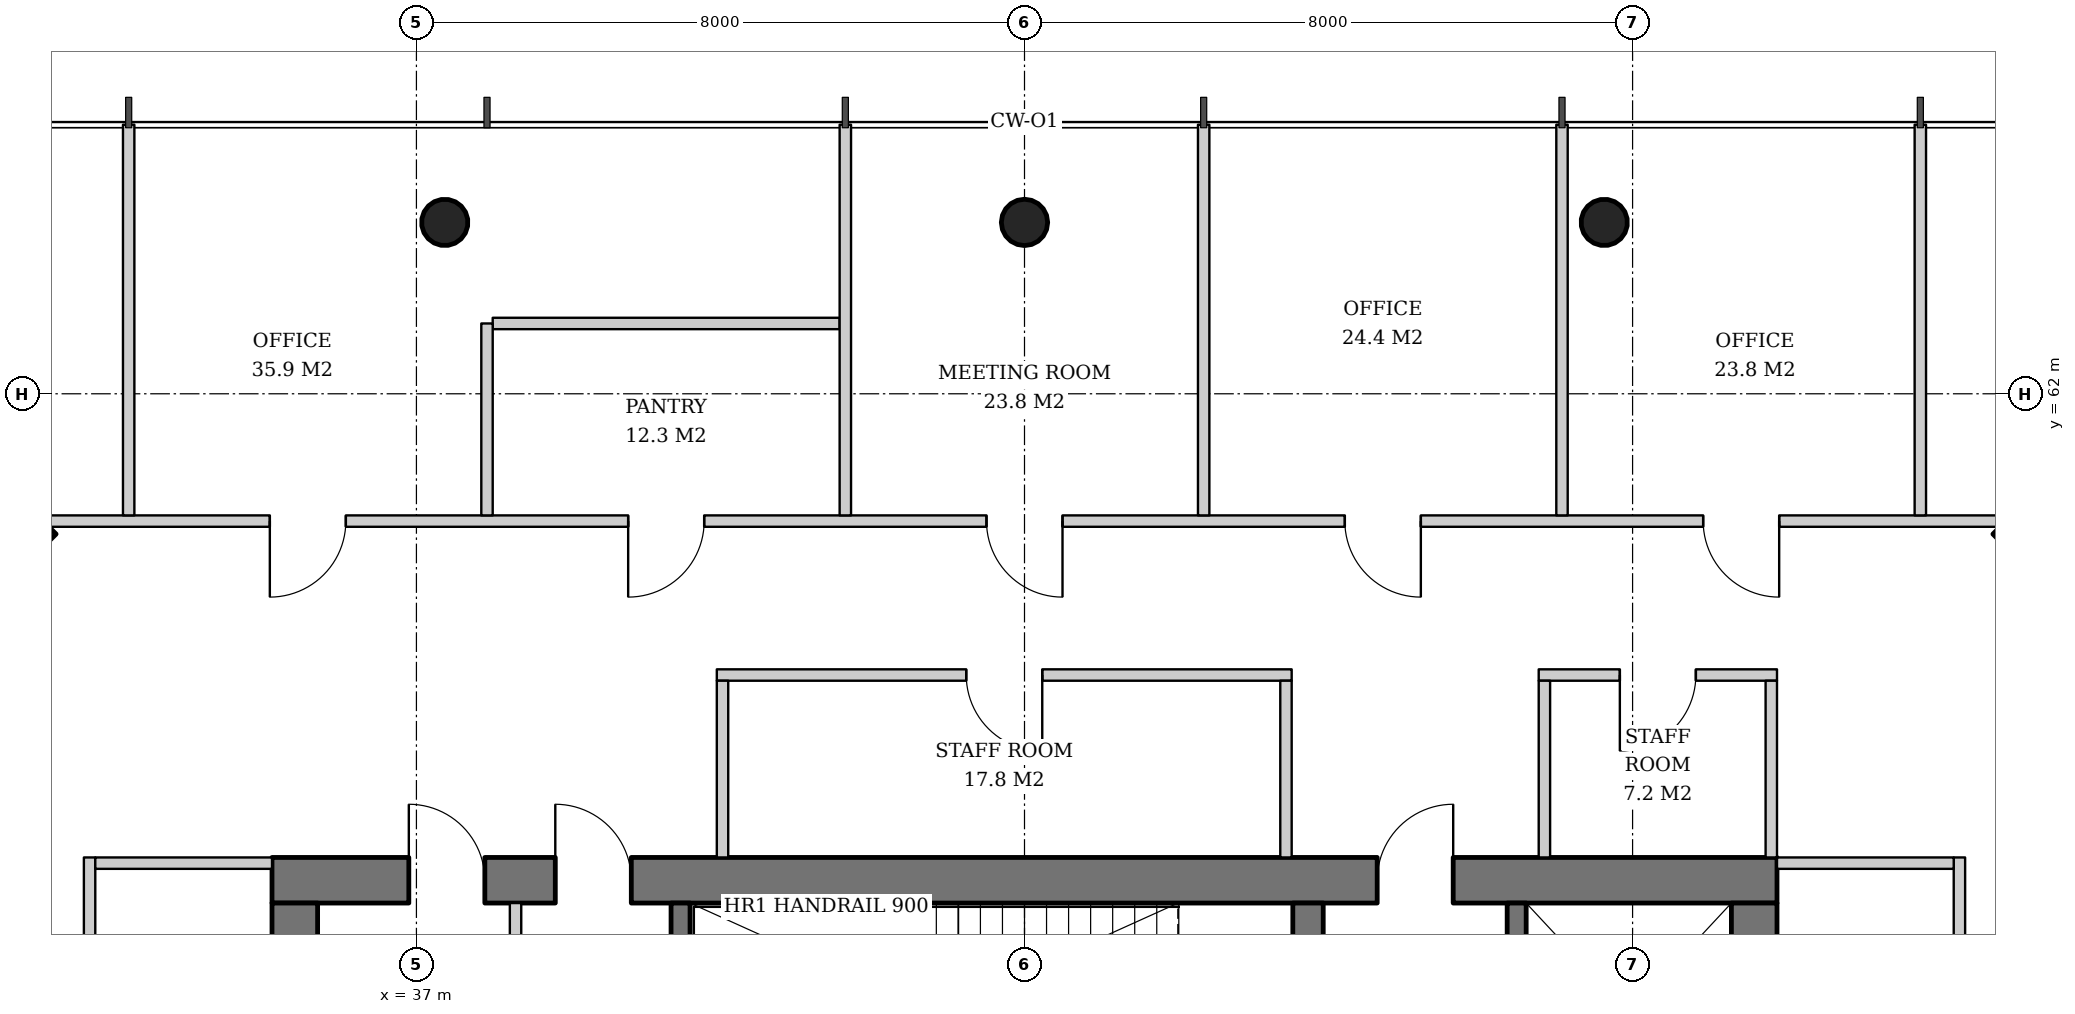
"""IFC4 building model, lengths in metres.
Left out: names, types, materials, properties, quantities, classifications, styles, units other than length and angle.
Written with IfcOpenShell. Run it as: python <this file> out.ifc"""

import sys

from ifc_helpers import new_model, si_unit, direction, frame, frame_2d, origin, origin_2d, place, context, subcontext, project, spatial, rectangle, hollow_circle, extrude, element, fill, save


model = new_model("IFC4")
c1 = context("Model", 3, precision=1e-05, world=origin(), true_north=direction((0.0, 1.0)))
c2 = subcontext(c1, "Body", "Model", "MODEL_VIEW")
j1 = project(units=[si_unit("LENGTHUNIT", "METRE"), si_unit("PLANEANGLEUNIT", "RADIAN")], contexts=[c1])
p1 = place(None, origin())
s1 = spatial("IfcSite", under=j1, at=p1, CompositionType="ELEMENT")
p2 = place(p1, origin())
s2 = spatial("IfcBuilding", under=s1, at=p2, CompositionType="ELEMENT")
p3 = place(p2, frame((0.0, 0.0, 199.6)))
s3 = spatial("IfcBuildingStorey", under=s2, at=p3, CompositionType="ELEMENT", Elevation=199.6)
for number, where, z_axis, x_axis in (
    (1, (59.193, 60.193, 0.0), (-0.032, -0.032, 0.999), (0.707, -0.707, 0.0)),
    (2, (30.807, 60.193, 0.0), (0.032, -0.032, 0.999), (0.707, 0.707, 0.0)),
):
    element("IfcColumn", number, at=place(p3, frame(where, z_axis=z_axis, x_axis=x_axis)), inside=s3, PredefinedType="COLUMN", context=c2, shape_type="SweptSolid", body=[
        extrude(rectangle(XDim=2.0, YDim=2.0, at=origin_2d()), origin(), (0.0, 0.0, 1.0), 3.804),
    ])
p4 = place(p3, frame((52.646, 64.293, 0.0), z_axis=(-0.015988230756, -0.031976461511, 0.999360736865), x_axis=(0.894427191, -0.4472135955, 0.0)))
e3 = element("IfcColumn", 3, at=p4, inside=s3, PredefinedType="COLUMN", context=c2, shape_type="SweptSolid", body=[
    extrude(hollow_circle(Radius=0.305, WallThickness=0.025, at=origin_2d()), origin(), (0.0, 0.0, 1.0), 3.802),
])
p5 = place(p3, frame((45.0, 64.293, 0.0), z_axis=(0.0, -0.031980549263, 0.999488491414), x_axis=(1.0, 0.0, 0.0)))
e4 = element("IfcColumn", 4, at=p5, inside=s3, PredefinedType="COLUMN", context=c2, shape_type="SweptSolid", body=[
    extrude(hollow_circle(Radius=0.305, WallThickness=0.025, at=origin_2d()), origin(), (0.0, 0.0, 1.0), 3.802),
])
p6 = place(p3, frame((37.354, 64.293, 0.0), z_axis=(0.015988230756, -0.031976461511, 0.999360736865), x_axis=(0.894427191, 0.4472135955, 0.0)))
e5 = element("IfcColumn", 5, at=p6, inside=s3, PredefinedType="COLUMN", context=c2, shape_type="SweptSolid", body=[
    extrude(hollow_circle(Radius=0.305, WallThickness=0.025, at=origin_2d()), origin(), (0.0, 0.0, 1.0), 3.802),
])
p7 = place(p3, frame((35.1, 55.6, 0.0), z_axis=(0.0, 0.0, 1.0), x_axis=(1.0, 0.0, 0.0)))
e6 = element("IfcWall", 6, at=p7, inside=s3, PredefinedType="SHEAR", context=c2, shape_type="SweptSolid", body=[
    extrude(rectangle(XDim=19.8, YDim=0.6, at=frame_2d((9.9, 0.0))), origin(), (0.0, 0.0, 1.0), 3.8),
])
p8 = place(p7, frame((14.54, 0.0, 0.0)))
e7 = element("IfcOpeningElement", 7, at=p8, cuts=e6, PredefinedType="OPENING", context=c2, shape_type="SweptSolid", body=[
    extrude(rectangle(XDim=1.0, YDim=2.1, at=frame_2d((0.5, 1.05))), frame((0.0, 0.31, 0.0), z_axis=(0.0, -1.0, 0.0), x_axis=(1.0, 0.0, 0.0)), (0.0, 0.0, 1.0), 0.62),
])
p9 = place(p7, frame((1.8, 0.0, 0.0)))
e8 = element("IfcOpeningElement", 8, at=p9, cuts=e6, PredefinedType="OPENING", context=c2, shape_type="SweptSolid", body=[
    extrude(rectangle(XDim=1.0, YDim=2.1, at=frame_2d((0.5, 1.05))), frame((0.0, 0.31, 0.0), z_axis=(0.0, -1.0, 0.0), x_axis=(1.0, 0.0, 0.0)), (0.0, 0.0, 1.0), 0.62),
])
p10 = place(p7, frame((3.727, 0.0, 0.0)))
e9 = element("IfcOpeningElement", 9, at=p10, cuts=e6, PredefinedType="OPENING", context=c2, shape_type="SweptSolid", body=[
    extrude(rectangle(XDim=1.0, YDim=2.1, at=frame_2d((0.5, 1.05))), frame((0.0, 0.31, 0.0), z_axis=(0.0, -1.0, 0.0), x_axis=(1.0, 0.0, 0.0)), (0.0, 0.0, 1.0), 0.62),
])
p11 = place(p3, frame((35.4, 36.7, 0.0), z_axis=(0.0, 0.0, 1.0), x_axis=(0.0, 1.0, 0.0)))
e10 = element("IfcWall", 10, at=p11, inside=s3, PredefinedType="SHEAR", context=c2, shape_type="SweptSolid", body=[
    extrude(rectangle(XDim=18.6, YDim=0.6, at=frame_2d((9.3, 0.0))), origin(), (0.0, 0.0, 1.0), 3.8),
])
p12 = place(p11, frame((8.4, 0.0, 0.0)))
e11 = element("IfcOpeningElement", 11, at=p12, cuts=e10, PredefinedType="OPENING", context=c2, shape_type="SweptSolid", body=[
    extrude(rectangle(XDim=1.8, YDim=2.4, at=frame_2d((0.9, 1.2))), frame((0.0, 0.31, 0.0), z_axis=(0.0, -1.0, 0.0), x_axis=(1.0, 0.0, 0.0)), (0.0, 0.0, 1.0), 0.62),
])
p13 = place(p3, frame((54.6, 36.7, 0.0), z_axis=(0.0, 0.0, 1.0), x_axis=(0.0, 1.0, 0.0)))
e12 = element("IfcWall", 12, at=p13, inside=s3, PredefinedType="SHEAR", context=c2, shape_type="SweptSolid", body=[
    extrude(rectangle(XDim=18.6, YDim=0.6, at=frame_2d((9.3, 0.0))), origin(), (0.0, 0.0, 1.0), 3.8),
])
p14 = place(p13, frame((8.4, 0.0, 0.0)))
e13 = element("IfcOpeningElement", 13, at=p14, cuts=e12, PredefinedType="OPENING", context=c2, shape_type="SweptSolid", body=[
    extrude(rectangle(XDim=1.8, YDim=2.4, at=frame_2d((0.9, 1.2))), frame((0.0, 0.31, 0.0), z_axis=(0.0, -1.0, 0.0), x_axis=(1.0, 0.0, 0.0)), (0.0, 0.0, 1.0), 0.62),
])
p15 = place(p3, frame((48.73, 52.4, 0.0), z_axis=(0.0, 0.0, 1.0), x_axis=(0.0, 1.0, 0.0)))
e14 = element("IfcWall", 14, at=p15, inside=s3, PredefinedType="SHEAR", context=c2, shape_type="SweptSolid", body=[
    extrude(rectangle(XDim=2.9, YDim=0.4, at=frame_2d((1.45, 0.0))), origin(), (0.0, 0.0, 1.0), 3.8),
])
p16 = place(p15, frame((0.3, 0.0, 0.0)))
e15 = element("IfcOpeningElement", 15, at=p16, cuts=e14, PredefinedType="OPENING", context=c2, shape_type="SweptSolid", body=[
    extrude(rectangle(XDim=1.0, YDim=2.1, at=frame_2d((0.5, 1.05))), frame((0.0, 0.21, 0.0), z_axis=(0.0, -1.0, 0.0), x_axis=(1.0, 0.0, 0.0)), (0.0, 0.0, 1.0), 0.42),
])
p17 = place(p3, frame((40.475, 52.4, 0.0), z_axis=(0.0, 0.0, 1.0), x_axis=(0.0, 1.0, 0.0)))
e16 = element("IfcWall", 16, at=p17, inside=s3, PredefinedType="SHEAR", context=c2, shape_type="SweptSolid", body=[
    extrude(rectangle(XDim=2.9, YDim=0.25, at=frame_2d((1.45, 0.0))), origin(), (0.0, 0.0, 1.0), 3.8),
])
p18 = place(p3, frame((51.475, 52.4, 0.0), z_axis=(0.0, 0.0, 1.0), x_axis=(0.0, 1.0, 0.0)))
e17 = element("IfcWall", 17, at=p18, inside=s3, PredefinedType="SHEAR", context=c2, shape_type="SweptSolid", body=[
    extrude(rectangle(XDim=2.9, YDim=0.25, at=frame_2d((1.45, 0.0))), origin(), (0.0, 0.0, 1.0), 3.8),
])
p19 = place(p18, frame((0.8, 0.0, 0.0)))
e18 = element("IfcOpeningElement", 18, at=p19, cuts=e17, PredefinedType="OPENING", context=c2, shape_type="SweptSolid", body=[
    extrude(rectangle(XDim=1.3, YDim=2.2, at=frame_2d((0.65, 1.1))), frame((0.0, 0.135, 0.0), z_axis=(0.0, -1.0, 0.0), x_axis=(1.0, 0.0, 0.0)), (0.0, 0.0, 1.0), 0.27),
])
p20 = place(p3, frame((38.304, 52.4, 0.0), z_axis=(0.0, 0.0, 1.0), x_axis=(0.0, 1.0, 0.0)))
e19 = element("IfcWall", 19, at=p20, inside=s3, PredefinedType="SOLIDWALL", context=c2, shape_type="SweptSolid", body=[
    extrude(rectangle(XDim=2.9, YDim=0.15, at=frame_2d((1.45, 0.0))), origin(), (0.0, 0.0, 1.0), 3.62),
])
p21 = place(p3, frame((57.3, 48.025, 0.0), z_axis=(0.0, 0.0, 1.0), x_axis=(0.0, 1.0, 0.0)))
e20 = element("IfcWall", 20, at=p21, inside=s3, PredefinedType="PARTITIONING", context=c2, shape_type="SweptSolid", body=[
    extrude(rectangle(XDim=7.875, YDim=0.15, at=frame_2d((3.938, 0.0))), origin(), (0.0, 0.0, 1.0), 2.867),
])
p22 = place(p21, frame((3.438, 0.0, 0.0)))
e21 = element("IfcOpeningElement", 21, at=p22, cuts=e20, PredefinedType="OPENING", context=c2, shape_type="SweptSolid", body=[
    extrude(rectangle(XDim=1.0, YDim=2.1, at=frame_2d((0.5, 1.05))), frame((0.0, 0.085, 0.0), z_axis=(0.0, -1.0, 0.0), x_axis=(1.0, 0.0, 0.0)), (0.0, 0.0, 1.0), 0.17),
])
p23 = place(p3, frame((54.9, 55.825, 0.0), z_axis=(0.0, 0.0, 1.0), x_axis=(1.0, 0.0, 0.0)))
e22 = element("IfcWall", 22, at=p23, inside=s3, PredefinedType="PARTITIONING", context=c2, shape_type="SweptSolid", body=[
    extrude(rectangle(XDim=2.325, YDim=0.15, at=frame_2d((1.163, 0.0))), origin(), (0.0, 0.0, 1.0), 3.62),
])
p24 = place(p3, frame((54.9, 58.3, 0.0), z_axis=(0.0, 0.0, 1.0), x_axis=(-1.0, 0.0, 0.0)))
e23 = element("IfcWall", 23, at=p24, inside=s3, PredefinedType="PARTITIONING", context=c2, shape_type="SweptSolid", body=[
    extrude(rectangle(XDim=3.135, YDim=0.15, at=frame_2d((1.567, 0.0))), origin(), (0.0, 0.0, 1.0), 2.92),
])
p25 = place(p24, frame((1.067, 0.0, 0.0)))
e24 = element("IfcOpeningElement", 24, at=p25, cuts=e23, PredefinedType="OPENING", context=c2, shape_type="SweptSolid", body=[
    extrude(rectangle(XDim=1.0, YDim=2.1, at=frame_2d((0.5, 1.05))), frame((0.0, 0.085, 0.0), z_axis=(0.0, -1.0, 0.0), x_axis=(1.0, 0.0, 0.0)), (0.0, 0.0, 1.0), 0.17),
])
p26 = place(p3, frame((54.825, 55.9, 0.0), z_axis=(0.0, 0.0, 1.0), x_axis=(0.0, 1.0, 0.0)))
e25 = element("IfcWall", 25, at=p26, inside=s3, PredefinedType="PARTITIONING", context=c2, shape_type="SweptSolid", body=[
    extrude(rectangle(XDim=2.325, YDim=0.15, at=frame_2d((1.163, 0.0))), origin(), (0.0, 0.0, 1.0), 2.867),
])
p27 = place(p3, frame((51.84, 55.9, 0.0), z_axis=(0.0, 0.0, 1.0), x_axis=(0.0, 1.0, 0.0)))
e26 = element("IfcWall", 26, at=p27, inside=s3, PredefinedType="PARTITIONING", context=c2, shape_type="SweptSolid", body=[
    extrude(rectangle(XDim=2.325, YDim=0.15, at=frame_2d((1.163, 0.0))), origin(), (0.0, 0.0, 1.0), 3.62),
])
p28 = place(p3, frame((48.515, 58.3, 0.0), z_axis=(0.0, 0.0, 1.0), x_axis=(-1.0, 0.0, 0.0)))
e27 = element("IfcWall", 27, at=p28, inside=s3, PredefinedType="PARTITIONING", context=c2, shape_type="SweptSolid", body=[
    extrude(rectangle(XDim=7.563, YDim=0.15, at=frame_2d((3.781, 0.0))), origin(), (0.0, 0.0, 1.0), 2.867),
])
p29 = place(p28, frame((3.281, 0.0, 0.0)))
e28 = element("IfcOpeningElement", 28, at=p29, cuts=e27, PredefinedType="OPENING", context=c2, shape_type="SweptSolid", body=[
    extrude(rectangle(XDim=1.0, YDim=2.1, at=frame_2d((0.5, 1.05))), frame((0.0, 0.085, 0.0), z_axis=(0.0, -1.0, 0.0), x_axis=(1.0, 0.0, 0.0)), (0.0, 0.0, 1.0), 0.17),
])
for number, where, z_axis, x_axis in (
    (29, (48.44, 55.9, 0.0), (0.0, 0.0, 1.0), (0.0, 1.0, 0.0)),
    (30, (41.027, 55.9, 0.0), (0.0, 0.0, 1.0), (0.0, 1.0, 0.0)),
):
    element("IfcWall", number, at=place(p3, frame(where, z_axis=z_axis, x_axis=x_axis)), inside=s3, PredefinedType="PARTITIONING", context=c2, shape_type="SweptSolid", body=[
        extrude(rectangle(XDim=2.325, YDim=0.15, at=frame_2d((1.163, 0.0))), origin(), (0.0, 0.0, 1.0), 3.62),
    ])
p30 = place(p3, frame((32.7, 55.9, 0.0), z_axis=(0.0, 0.0, 1.0), x_axis=(0.0, -1.0, 0.0)))
e31 = element("IfcWall", 31, at=p30, inside=s3, PredefinedType="PARTITIONING", context=c2, shape_type="SweptSolid", body=[
    extrude(rectangle(XDim=7.875, YDim=0.15, at=frame_2d((3.938, 0.0))), origin(), (0.0, 0.0, 1.0), 2.867),
])
p31 = place(p30, frame((3.438, 0.0, 0.0)))
e32 = element("IfcOpeningElement", 32, at=p31, cuts=e31, PredefinedType="OPENING", context=c2, shape_type="SweptSolid", body=[
    extrude(rectangle(XDim=1.0, YDim=2.1, at=frame_2d((0.5, 1.05))), frame((0.0, 0.085, 0.0), z_axis=(0.0, -1.0, 0.0), x_axis=(1.0, 0.0, 0.0)), (0.0, 0.0, 1.0), 0.17),
])
p32 = place(p3, frame((35.1, 55.825, 0.0), z_axis=(0.0, 0.0, 1.0), x_axis=(-1.0, 0.0, 0.0)))
e33 = element("IfcWall", 33, at=p32, inside=s3, PredefinedType="PARTITIONING", context=c2, shape_type="SweptSolid", body=[
    extrude(rectangle(XDim=2.325, YDim=0.15, at=frame_2d((1.163, 0.0))), origin(), (0.0, 0.0, 1.0), 2.867),
])
p33 = place(p3, frame((42.568, 62.925, 0.0), z_axis=(0.0, 0.0, 1.0), x_axis=(-1.0, 0.0, 0.0)))
e34 = element("IfcWall", 34, at=p33, inside=s3, PredefinedType="PARTITIONING", context=c2, shape_type="SweptSolid", body=[
    extrude(rectangle(XDim=4.564, YDim=0.15, at=frame_2d((2.282, 0.0))), origin(), (0.0, 0.0, 1.0), 2.867),
])
p34 = place(p3, frame((57.836, 60.325, 0.0), z_axis=(0.0, 0.0, 1.0), x_axis=(-1.0, 0.0, 0.0)))
e35 = element("IfcWall", 35, at=p34, inside=s3, PredefinedType="PARTITIONING", context=c2, shape_type="SweptSolid", body=[
    extrude(rectangle(XDim=25.671, YDim=0.15, at=frame_2d((12.836, 0.0))), origin(), (0.0, 0.0, 1.0), 2.867),
])
p35 = place(p34, frame((2.907, 0.0, 0.0)))
e36 = element("IfcOpeningElement", 36, at=p35, cuts=e35, PredefinedType="OPENING", context=c2, shape_type="SweptSolid", body=[
    extrude(rectangle(XDim=1.0, YDim=2.1, at=frame_2d((0.5, 1.05))), frame((0.0, 0.085, 0.0), z_axis=(0.0, -1.0, 0.0), x_axis=(1.0, 0.0, 0.0)), (0.0, 0.0, 1.0), 0.17),
])
p36 = place(p34, frame((7.622, 0.0, 0.0)))
e37 = element("IfcOpeningElement", 37, at=p36, cuts=e35, PredefinedType="OPENING", context=c2, shape_type="SweptSolid", body=[
    extrude(rectangle(XDim=1.0, YDim=2.1, at=frame_2d((0.5, 1.05))), frame((0.0, 0.085, 0.0), z_axis=(0.0, -1.0, 0.0), x_axis=(1.0, 0.0, 0.0)), (0.0, 0.0, 1.0), 0.17),
])
p37 = place(p34, frame((12.336, 0.0, 0.0)))
e38 = element("IfcOpeningElement", 38, at=p37, cuts=e35, PredefinedType="OPENING", context=c2, shape_type="SweptSolid", body=[
    extrude(rectangle(XDim=1.0, YDim=2.1, at=frame_2d((0.5, 1.05))), frame((0.0, 0.085, 0.0), z_axis=(0.0, -1.0, 0.0), x_axis=(1.0, 0.0, 0.0)), (0.0, 0.0, 1.0), 0.17),
])
p38 = place(p34, frame((17.05, 0.0, 0.0)))
e39 = element("IfcOpeningElement", 39, at=p38, cuts=e35, PredefinedType="OPENING", context=c2, shape_type="SweptSolid", body=[
    extrude(rectangle(XDim=1.0, YDim=2.1, at=frame_2d((0.5, 1.05))), frame((0.0, 0.085, 0.0), z_axis=(0.0, -1.0, 0.0), x_axis=(1.0, 0.0, 0.0)), (0.0, 0.0, 1.0), 0.17),
])
p39 = place(p34, frame((21.764, 0.0, 0.0)))
e40 = element("IfcOpeningElement", 40, at=p39, cuts=e35, PredefinedType="OPENING", context=c2, shape_type="SweptSolid", body=[
    extrude(rectangle(XDim=1.0, YDim=2.1, at=frame_2d((0.5, 1.05))), frame((0.0, 0.085, 0.0), z_axis=(0.0, -1.0, 0.0), x_axis=(1.0, 0.0, 0.0)), (0.0, 0.0, 1.0), 0.17),
])
for number, where, z_axis, x_axis in (
    (41, (56.786, 60.4, 0.0), (0.0, 0.0, 1.0), (0.0, 1.0, 0.0)),
    (42, (52.072, 60.4, 0.0), (0.0, 0.0, 1.0), (0.0, 1.0, 0.0)),
    (43, (47.357, 60.4, 0.0), (0.0, 0.0, 1.0), (0.0, 1.0, 0.0)),
):
    element("IfcWall", number, at=place(p3, frame(where, z_axis=z_axis, x_axis=x_axis)), inside=s3, PredefinedType="PARTITIONING", context=c2, shape_type="SweptSolid", body=[
        extrude(rectangle(XDim=5.14, YDim=0.15, at=frame_2d((2.57, 0.0))), origin(), (0.0, 0.0, 1.0), 3.12),
    ])
p40 = place(p3, frame((42.643, 60.4, 0.0), z_axis=(0.0, 0.0, 1.0), x_axis=(0.0, 1.0, 0.0)))
e44 = element("IfcWall", 44, at=p40, inside=s3, PredefinedType="PARTITIONING", context=c2, shape_type="SweptSolid", body=[
    extrude(rectangle(XDim=5.14, YDim=0.15, at=frame_2d((2.57, 0.0))), origin(), (0.0, 0.0, 1.0), 2.867),
])
p41 = place(p3, frame((37.928, 60.4, 0.0), z_axis=(0.0, 0.0, 1.0), x_axis=(0.0, 1.0, 0.0)))
e45 = element("IfcWall", 45, at=p41, inside=s3, PredefinedType="PARTITIONING", context=c2, shape_type="SweptSolid", body=[
    extrude(rectangle(XDim=2.525, YDim=0.15, at=frame_2d((1.263, 0.0))), origin(), (0.0, 0.0, 1.0), 3.62),
])
p42 = place(p3, frame((33.214, 60.4, 0.0), z_axis=(0.0, 0.0, 1.0), x_axis=(0.0, 1.0, 0.0)))
e46 = element("IfcWall", 46, at=p42, inside=s3, PredefinedType="PARTITIONING", context=c2, shape_type="SweptSolid", body=[
    extrude(rectangle(XDim=5.14, YDim=0.15, at=frame_2d((2.57, 0.0))), origin(), (0.0, 0.0, 1.0), 3.12),
])
p43 = place(p8, origin())
e47 = element("IfcDoor", 47, at=p43, inside=s3, OperationType="SINGLE_SWING_RIGHT", PredefinedType="DOOR", context=c2, shape_type="SweptSolid", body=[
    extrude(rectangle(XDim=1.0, YDim=2.1, at=frame_2d((0.5, 1.05))), frame((0.0, 0.025, 0.0), z_axis=(0.0, -1.0, 0.0), x_axis=(1.0, 0.0, 0.0)), (0.0, 0.0, 1.0), 0.05),
])
fill(e7, e47)
p44 = place(p9, origin())
e48 = element("IfcDoor", 48, at=p44, inside=s3, OperationType="SINGLE_SWING_LEFT", PredefinedType="DOOR", context=c2, shape_type="SweptSolid", body=[
    extrude(rectangle(XDim=1.0, YDim=2.1, at=frame_2d((0.5, 1.05))), frame((0.0, -0.24, 0.0), z_axis=(0.0, -1.0, 0.0), x_axis=(1.0, 0.0, 0.0)), (0.0, 0.0, 1.0), 0.05),
])
fill(e8, e48)
p45 = place(p10, origin())
e49 = element("IfcDoor", 49, at=p45, inside=s3, OperationType="SINGLE_SWING_LEFT", PredefinedType="DOOR", context=c2, shape_type="SweptSolid", body=[
    extrude(rectangle(XDim=1.0, YDim=2.1, at=frame_2d((0.5, 1.05))), frame((0.0, -0.24, 0.0), z_axis=(0.0, -1.0, 0.0), x_axis=(1.0, 0.0, 0.0)), (0.0, 0.0, 1.0), 0.05),
])
fill(e9, e49)
p46 = place(p25, origin())
e50 = element("IfcDoor", 50, at=p46, inside=s3, OperationType="SINGLE_SWING_RIGHT", PredefinedType="DOOR", context=c2, shape_type="SweptSolid", body=[
    extrude(rectangle(XDim=1.0, YDim=2.1, at=frame_2d((0.5, 1.05))), frame((0.0, 0.025, 0.0), z_axis=(0.0, -1.0, 0.0), x_axis=(1.0, 0.0, 0.0)), (0.0, 0.0, 1.0), 0.05),
])
fill(e24, e50)
p47 = place(p29, origin())
e51 = element("IfcDoor", 51, at=p47, inside=s3, OperationType="SINGLE_SWING_LEFT", PredefinedType="DOOR", context=c2, shape_type="SweptSolid", body=[
    extrude(rectangle(XDim=1.0, YDim=2.1, at=frame_2d((0.5, 1.05))), frame((0.0, 0.025, 0.0), z_axis=(0.0, -1.0, 0.0), x_axis=(1.0, 0.0, 0.0)), (0.0, 0.0, 1.0), 0.05),
])
fill(e28, e51)
p48 = place(p35, origin())
e52 = element("IfcDoor", 52, at=p48, inside=s3, OperationType="SINGLE_SWING_LEFT", PredefinedType="DOOR", context=c2, shape_type="SweptSolid", body=[
    extrude(rectangle(XDim=1.0, YDim=2.1, at=frame_2d((0.5, 1.05))), frame((0.0, 0.025, 0.0), z_axis=(0.0, -1.0, 0.0), x_axis=(1.0, 0.0, 0.0)), (0.0, 0.0, 1.0), 0.05),
])
fill(e36, e52)
p49 = place(p36, origin())
e53 = element("IfcDoor", 53, at=p49, inside=s3, OperationType="SINGLE_SWING_LEFT", PredefinedType="DOOR", context=c2, shape_type="SweptSolid", body=[
    extrude(rectangle(XDim=1.0, YDim=2.1, at=frame_2d((0.5, 1.05))), frame((0.0, 0.025, 0.0), z_axis=(0.0, -1.0, 0.0), x_axis=(1.0, 0.0, 0.0)), (0.0, 0.0, 1.0), 0.05),
])
fill(e37, e53)
p50 = place(p37, origin())
e54 = element("IfcDoor", 54, at=p50, inside=s3, OperationType="SINGLE_SWING_LEFT", PredefinedType="DOOR", context=c2, shape_type="SweptSolid", body=[
    extrude(rectangle(XDim=1.0, YDim=2.1, at=frame_2d((0.5, 1.05))), frame((0.0, 0.025, 0.0), z_axis=(0.0, -1.0, 0.0), x_axis=(1.0, 0.0, 0.0)), (0.0, 0.0, 1.0), 0.05),
])
fill(e38, e54)
p51 = place(p38, origin())
e55 = element("IfcDoor", 55, at=p51, inside=s3, OperationType="SINGLE_SWING_RIGHT", PredefinedType="DOOR", context=c2, shape_type="SweptSolid", body=[
    extrude(rectangle(XDim=1.0, YDim=2.1, at=frame_2d((0.5, 1.05))), frame((0.0, 0.025, 0.0), z_axis=(0.0, -1.0, 0.0), x_axis=(1.0, 0.0, 0.0)), (0.0, 0.0, 1.0), 0.05),
])
fill(e39, e55)
p52 = place(p39, origin())
e56 = element("IfcDoor", 56, at=p52, inside=s3, OperationType="SINGLE_SWING_RIGHT", PredefinedType="DOOR", context=c2, shape_type="SweptSolid", body=[
    extrude(rectangle(XDim=1.0, YDim=2.1, at=frame_2d((0.5, 1.05))), frame((0.0, 0.025, 0.0), z_axis=(0.0, -1.0, 0.0), x_axis=(1.0, 0.0, 0.0)), (0.0, 0.0, 1.0), 0.05),
])
fill(e40, e56)
save(model, sys.argv[1])
